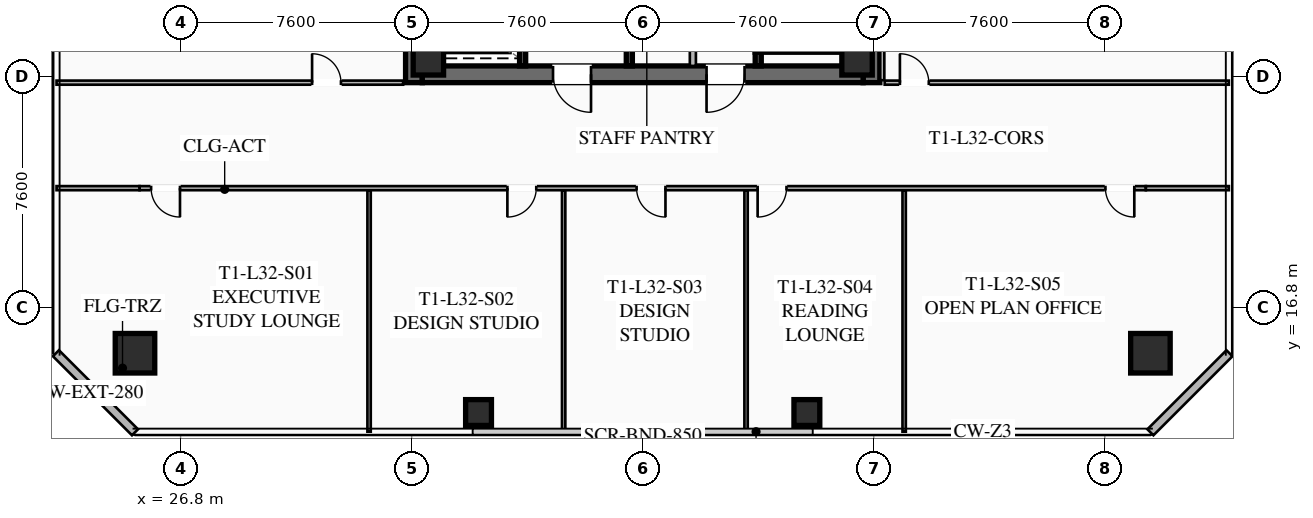
"""IFC4 building model, lengths in metres.
Left out: names, types, materials, properties, quantities, classifications, styles, units other than length and angle.
Written with IfcOpenShell. Run it as: python <this file> out.ifc"""

import sys

from ifc_helpers import new_model, si_unit, direction, frame, frame_2d, origin, origin_2d, place, context, subcontext, project, spatial, rectangle, hollow_rectangle, extrude, element, fill, save


model = new_model("IFC4")
c1 = context("Model", 3, precision=1e-05, world=origin(), true_north=direction((0.0, 1.0)))
c2 = subcontext(c1, "Body", "Model", "MODEL_VIEW")
j1 = project(units=[si_unit("LENGTHUNIT", "METRE"), si_unit("PLANEANGLEUNIT", "RADIAN")], contexts=[c1])
p1 = place(None, origin())
s1 = spatial("IfcSite", under=j1, at=p1, CompositionType="ELEMENT")
p2 = place(p1, origin())
s2 = spatial("IfcBuilding", under=s1, at=p2, CompositionType="ELEMENT")
p3 = place(p2, frame((0.0, 0.0, 121.5)))
s3 = spatial("IfcBuildingStorey", under=s2, at=p3, CompositionType="ELEMENT", Elevation=121.5)
for number, where, z_axis, x_axis in (
    (1, (34.475, 24.2, 0.0), (0.0, 0.0, 1.0), (0.0, 1.0, 0.0)),
    (2, (49.525, 39.8, 0.0), (0.0, 0.0, 1.0), (0.0, -1.0, 0.0)),
):
    element("IfcWall", number, at=place(p3, frame(where, z_axis=z_axis, x_axis=x_axis)), inside=s3, PredefinedType="SHEAR", context=c2, shape_type="SweptSolid", body=[
        extrude(rectangle(XDim=15.6, YDim=0.55, at=frame_2d((7.8, 0.0))), origin(), (0.0, 0.0, 1.0), 3.55),
    ])
p4 = place(p3, frame((49.25, 24.475, 0.0), z_axis=(0.0, 0.0, 1.0), x_axis=(-1.0, 0.0, 0.0)))
e3 = element("IfcWall", 3, at=p4, inside=s3, PredefinedType="SHEAR", context=c2, shape_type="SweptSolid", body=[
    extrude(rectangle(XDim=14.5, YDim=0.55, at=frame_2d((7.25, 0.0))), origin(), (0.0, 0.0, 1.0), 3.55),
])
p5 = place(p4, frame((8.95, 0.0, 0.0)))
e4 = element("IfcOpeningElement", 4, at=p5, cuts=e3, PredefinedType="OPENING", context=c2, shape_type="SweptSolid", body=[
    extrude(rectangle(XDim=1.25, YDim=2.25, at=frame_2d((0.625, 1.125))), frame((0.0, 0.285, 0.0), z_axis=(0.0, -1.0, 0.0), x_axis=(1.0, 0.0, 0.0)), (0.0, 0.0, 1.0), 0.57),
])
p6 = place(p4, frame((3.9, 0.0, 0.0)))
e5 = element("IfcOpeningElement", 5, at=p6, cuts=e3, PredefinedType="OPENING", context=c2, shape_type="SweptSolid", body=[
    extrude(rectangle(XDim=1.25, YDim=2.25, at=frame_2d((0.625, 1.125))), frame((0.0, 0.285, 0.0), z_axis=(0.0, -1.0, 0.0), x_axis=(1.0, 0.0, 0.0)), (0.0, 0.0, 1.0), 0.57),
])
for number, where, z_axis, x_axis in (
    (6, (34.95, 24.95, 0.0), (0.0, 0.0, 1.0), (1.0, 0.0, 0.0)),
    (7, (49.05, 24.95, 0.0), (0.0, 0.0, 1.0), (1.0, 0.0, 0.0)),
):
    element("IfcColumn", number, at=place(p3, frame(where, z_axis=z_axis, x_axis=x_axis)), inside=s3, PredefinedType="COLUMN", context=c2, shape_type="SweptSolid", body=[
        extrude(hollow_rectangle(XDim=1.0, YDim=1.0, WallThickness=0.04, at=origin_2d()), origin(), (0.0, 0.0, 1.0), 3.37),
    ])
for number, where, z_axis, x_axis in (
    (8, (25.3, 15.3, 0.0), (0.0, 0.0, 1.0), (1.0, 0.0, 0.0)),
    (9, (58.7, 15.3, 0.0), (0.0, 0.0, 1.0), (1.0, 0.0, 0.0)),
):
    element("IfcColumn", number, at=place(p3, frame(where, z_axis=z_axis, x_axis=x_axis)), inside=s3, PredefinedType="COLUMN", context=c2, shape_type="SweptSolid", body=[
        extrude(hollow_rectangle(XDim=1.3, YDim=1.3, WallThickness=0.05, at=origin_2d()), origin(), (0.0, 0.0, 1.0), 3.37),
    ])
for number, where, z_axis, x_axis in (
    (10, (36.6, 13.35, 0.0), (0.0, 0.0, 1.0), (1.0, 0.0, 0.0)),
    (11, (47.4, 13.35, 0.0), (0.0, 0.0, 1.0), (1.0, 0.0, 0.0)),
):
    element("IfcColumn", number, at=place(p3, frame(where, z_axis=z_axis, x_axis=x_axis)), inside=s3, PredefinedType="COLUMN", context=c2, shape_type="SweptSolid", body=[
        extrude(hollow_rectangle(XDim=0.85, YDim=0.85, WallThickness=0.035, at=origin_2d()), origin(), (0.0, 0.0, 1.0), 3.37),
    ])
for number, where, z_axis, x_axis in (
    (12, (25.3, 12.7, 0.0), (0.0, 0.0, 1.0), (-0.707, 0.707, 0.0)),
    (13, (61.3, 15.3, 0.0), (0.0, 0.0, 1.0), (-0.707, -0.707, 0.0)),
):
    element("IfcWall", number, at=place(p3, frame(where, z_axis=z_axis, x_axis=x_axis)), inside=s3, PredefinedType="SOLIDWALL", context=c2, shape_type="SweptSolid", body=[
        extrude(rectangle(XDim=3.677, YDim=0.28, at=frame_2d((1.838, 0.0))), origin(), (0.0, 0.0, 1.0), 3.37),
    ])
p7 = place(p3, frame((45.8, 32.8, 0.0), z_axis=(0.0, 0.0, 1.0), x_axis=(0.0, -1.0, 0.0)))
e14 = element("IfcWall", 14, at=p7, inside=s3, PredefinedType="SHEAR", context=c2, shape_type="SweptSolid", body=[
    extrude(rectangle(XDim=8.05, YDim=0.2, at=frame_2d((4.025, 0.0))), origin(), (0.0, 0.0, 1.0), 3.37),
])
p8 = place(p7, frame((0.45, 0.0, 0.0)))
e15 = element("IfcOpeningElement", 15, at=p8, cuts=e14, PredefinedType="OPENING", context=c2, shape_type="SweptSolid", body=[
    extrude(rectangle(XDim=1.15, YDim=2.2, at=frame_2d((0.575, 1.1))), frame((0.0, 0.11, 0.0), z_axis=(0.0, -1.0, 0.0), x_axis=(1.0, 0.0, 0.0)), (0.0, 0.0, 1.0), 0.22),
])
p9 = place(p3, frame((41.56, 24.75, 0.0), z_axis=(0.0, 0.0, 1.0), x_axis=(0.0, 1.0, 0.0)))
e16 = element("IfcWall", 16, at=p9, inside=s3, PredefinedType="SHEAR", context=c2, shape_type="SweptSolid", body=[
    extrude(rectangle(XDim=14.5, YDim=0.2, at=frame_2d((7.25, 0.0))), origin(), (0.0, 0.0, 1.0), 3.37),
])
p10 = place(p3, frame((38.05, 24.75, 0.0), z_axis=(0.0, 0.0, 1.0), x_axis=(0.0, 1.0, 0.0)))
e17 = element("IfcWall", 17, at=p10, inside=s3, PredefinedType="SHEAR", context=c2, shape_type="SweptSolid", body=[
    extrude(rectangle(XDim=6.45, YDim=0.2, at=frame_2d((3.225, 0.0))), origin(), (0.0, 0.0, 1.0), 3.37),
])
p11 = place(p10, frame((4.875, 0.0, 0.0)))
e18 = element("IfcOpeningElement", 18, at=p11, cuts=e17, PredefinedType="OPENING", context=c2, shape_type="SweptSolid", body=[
    extrude(rectangle(XDim=1.3, YDim=2.25, at=frame_2d((0.65, 1.125))), frame((0.0, 0.11, 0.0), z_axis=(0.0, -1.0, 0.0), x_axis=(1.0, 0.0, 0.0)), (0.0, 0.0, 1.0), 0.22),
])
p12 = place(p10, frame((2.875, 0.0, 0.0)))
e19 = element("IfcOpeningElement", 19, at=p12, cuts=e17, PredefinedType="OPENING", context=c2, shape_type="SweptSolid", body=[
    extrude(rectangle(XDim=1.3, YDim=2.25, at=frame_2d((0.65, 1.125))), frame((0.0, 0.11, 0.0), z_axis=(0.0, -1.0, 0.0), x_axis=(1.0, 0.0, 0.0)), (0.0, 0.0, 1.0), 0.22),
])
p13 = place(p10, frame((0.675, 0.0, 0.0)))
e20 = element("IfcOpeningElement", 20, at=p13, cuts=e17, PredefinedType="OPENING", context=c2, shape_type="SweptSolid", body=[
    extrude(rectangle(XDim=1.3, YDim=2.25, at=frame_2d((0.65, 1.125))), frame((0.0, 0.11, 0.0), z_axis=(0.0, -1.0, 0.0), x_axis=(1.0, 0.0, 0.0)), (0.0, 0.0, 1.0), 0.22),
])
p14 = place(p3, frame((43.65, 24.75, 0.0), z_axis=(0.0, 0.0, 1.0), x_axis=(0.0, 1.0, 0.0)))
e21 = element("IfcWall", 21, at=p14, inside=s3, PredefinedType="SOLIDWALL", context=c2, shape_type="SweptSolid", body=[
    extrude(rectangle(XDim=6.9, YDim=0.2, at=frame_2d((3.45, 0.0))), origin(), (0.0, 0.0, 1.0), 2.723),
])
p15 = place(p14, frame((0.85, 0.0, 0.0)))
e22 = element("IfcOpeningElement", 22, at=p15, cuts=e21, PredefinedType="OPENING", context=c2, shape_type="SweptSolid", body=[
    extrude(rectangle(XDim=0.95, YDim=2.05, at=frame_2d((0.475, 1.025))), frame((0.0, 0.11, 0.0), z_axis=(0.0, -1.0, 0.0), x_axis=(1.0, 0.0, 0.0)), (0.0, 0.0, 1.0), 0.22),
])
p16 = place(p14, frame((4.8, 0.0, 0.0)))
e23 = element("IfcOpeningElement", 23, at=p16, cuts=e21, PredefinedType="OPENING", context=c2, shape_type="SweptSolid", body=[
    extrude(rectangle(XDim=1.05, YDim=2.2, at=frame_2d((0.525, 1.1))), frame((0.0, 0.11, 0.0), z_axis=(0.0, -1.0, 0.0), x_axis=(1.0, 0.0, 0.0)), (0.0, 0.0, 1.0), 0.22),
])
p17 = place(p3, frame((58.55, 20.73, 0.0), z_axis=(0.0, 0.0, 1.0), x_axis=(-1.0, 0.0, 0.0)))
e24 = element("IfcWall", 24, at=p17, inside=s3, PredefinedType="PARTITIONING", context=c2, shape_type="SweptSolid", body=[
    extrude(rectangle(XDim=33.1, YDim=0.135, at=frame_2d((16.55, 0.0))), origin(), (0.0, 0.0, 1.0), 2.723),
])
p18 = place(p17, frame((31.77, 0.0, 0.0)))
e25 = element("IfcOpeningElement", 25, at=p18, cuts=e24, PredefinedType="OPENING", context=c2, shape_type="SweptSolid", body=[
    extrude(rectangle(XDim=0.95, YDim=2.05, at=frame_2d((0.475, 1.025))), frame((0.0, 0.077, 0.0), z_axis=(0.0, -1.0, 0.0), x_axis=(1.0, 0.0, 0.0)), (0.0, 0.0, 1.0), 0.155),
])
p19 = place(p17, frame((20.051, 0.0, 0.0)))
e26 = element("IfcOpeningElement", 26, at=p19, cuts=e24, PredefinedType="OPENING", context=c2, shape_type="SweptSolid", body=[
    extrude(rectangle(XDim=0.95, YDim=2.05, at=frame_2d((0.475, 1.025))), frame((0.0, 0.077, 0.0), z_axis=(0.0, -1.0, 0.0), x_axis=(1.0, 0.0, 0.0)), (0.0, 0.0, 1.0), 0.155),
])
p20 = place(p17, frame((15.801, 0.0, 0.0)))
e27 = element("IfcOpeningElement", 27, at=p20, cuts=e24, PredefinedType="OPENING", context=c2, shape_type="SweptSolid", body=[
    extrude(rectangle(XDim=0.95, YDim=2.05, at=frame_2d((0.475, 1.025))), frame((0.0, 0.077, 0.0), z_axis=(0.0, -1.0, 0.0), x_axis=(1.0, 0.0, 0.0)), (0.0, 0.0, 1.0), 0.155),
])
p21 = place(p17, frame((11.82, 0.0, 0.0)))
e28 = element("IfcOpeningElement", 28, at=p21, cuts=e24, PredefinedType="OPENING", context=c2, shape_type="SweptSolid", body=[
    extrude(rectangle(XDim=0.95, YDim=2.05, at=frame_2d((0.475, 1.025))), frame((0.0, 0.077, 0.0), z_axis=(0.0, -1.0, 0.0), x_axis=(1.0, 0.0, 0.0)), (0.0, 0.0, 1.0), 0.155),
])
p22 = place(p17, frame((0.38, 0.0, 0.0)))
e29 = element("IfcOpeningElement", 29, at=p22, cuts=e24, PredefinedType="OPENING", context=c2, shape_type="SweptSolid", body=[
    extrude(rectangle(XDim=0.95, YDim=2.05, at=frame_2d((0.475, 1.025))), frame((0.0, 0.077, 0.0), z_axis=(0.0, -1.0, 0.0), x_axis=(1.0, 0.0, 0.0)), (0.0, 0.0, 1.0), 0.155),
])
for number, where, z_axis, x_axis in (
    (30, (22.72, 20.73, 0.0), (0.0, 0.0, 1.0), (1.0, 0.0, 0.0)),
    (31, (58.55, 20.73, 0.0), (0.0, 0.0, 1.0), (1.0, 0.0, 0.0)),
):
    element("IfcWall", number, at=place(p3, frame(where, z_axis=z_axis, x_axis=x_axis)), inside=s3, PredefinedType="PARTITIONING", context=c2, shape_type="SweptSolid", body=[
        extrude(rectangle(XDim=2.73, YDim=0.135, at=frame_2d((1.365, 0.0))), origin(), (0.0, 0.0, 1.0), 2.723),
    ])
for number, where, z_axis, x_axis in (
    (32, (33.0, 12.72, 0.0), (0.0, 0.0, 1.0), (0.0, 1.0, 0.0)),
    (33, (39.4, 12.72, 0.0), (0.0, 0.0, 1.0), (0.0, 1.0, 0.0)),
    (34, (45.4, 12.72, 0.0), (0.0, 0.0, 1.0), (0.0, 1.0, 0.0)),
    (35, (50.6, 12.72, 0.0), (0.0, 0.0, 1.0), (0.0, 1.0, 0.0)),
):
    element("IfcWall", number, at=place(p3, frame(where, z_axis=z_axis, x_axis=x_axis)), inside=s3, PredefinedType="PARTITIONING", context=c2, shape_type="SweptSolid", body=[
        extrude(rectangle(XDim=7.93, YDim=0.11, at=frame_2d((3.965, 0.0))), origin(), (0.0, 0.0, 1.0), 2.723),
    ])
p23 = place(p3, frame((49.88, 39.72, 0.0), z_axis=(0.0, 0.0, 1.0), x_axis=(0.0, -1.0, 0.0)))
e36 = element("IfcWall", 36, at=p23, inside=s3, PredefinedType="PARTITIONING", context=c2, shape_type="SweptSolid", body=[
    extrude(rectangle(XDim=15.44, YDim=0.135, at=frame_2d((7.72, 0.0))), origin(), (0.0, 0.0, 1.0), 2.723),
])
p24 = place(p3, frame((49.96, 24.2, 0.0), z_axis=(0.0, 0.0, 1.0), x_axis=(1.0, 0.0, 0.0)))
e37 = element("IfcWall", 37, at=p24, inside=s3, PredefinedType="PARTITIONING", context=c2, shape_type="SweptSolid", body=[
    extrude(rectangle(XDim=11.32, YDim=0.135, at=frame_2d((5.66, 0.0))), origin(), (0.0, 0.0, 1.0), 2.723),
])
p25 = place(p24, frame((0.5, 0.0, 0.0)))
e38 = element("IfcOpeningElement", 38, at=p25, cuts=e37, PredefinedType="OPENING", context=c2, shape_type="SweptSolid", body=[
    extrude(rectangle(XDim=0.95, YDim=2.05, at=frame_2d((0.475, 1.025))), frame((0.0, 0.077, 0.0), z_axis=(0.0, -1.0, 0.0), x_axis=(1.0, 0.0, 0.0)), (0.0, 0.0, 1.0), 0.155),
])
p26 = place(p3, frame((22.72, 24.2, 0.0), z_axis=(0.0, 0.0, 1.0), x_axis=(1.0, 0.0, 0.0)))
e39 = element("IfcWall", 39, at=p26, inside=s3, PredefinedType="PARTITIONING", context=c2, shape_type="SweptSolid", body=[
    extrude(rectangle(XDim=11.4, YDim=0.135, at=frame_2d((5.7, 0.0))), origin(), (0.0, 0.0, 1.0), 2.723),
])
p27 = place(p26, frame((8.405, 0.0, 0.0)))
e40 = element("IfcOpeningElement", 40, at=p27, cuts=e39, PredefinedType="OPENING", context=c2, shape_type="SweptSolid", body=[
    extrude(rectangle(XDim=0.95, YDim=2.05, at=frame_2d((0.475, 1.025))), frame((0.0, 0.077, 0.0), z_axis=(0.0, -1.0, 0.0), x_axis=(1.0, 0.0, 0.0)), (0.0, 0.0, 1.0), 0.155),
])
p28 = place(p5, origin())
e41 = element("IfcDoor", 41, at=p28, inside=s3, OperationType="SINGLE_SWING_LEFT", PredefinedType="DOOR", context=c2, shape_type="SweptSolid", body=[
    extrude(rectangle(XDim=1.25, YDim=2.25, at=frame_2d((0.625, 1.125))), frame((0.0, 0.025, 0.0), z_axis=(0.0, -1.0, 0.0), x_axis=(1.0, 0.0, 0.0)), (0.0, 0.0, 1.0), 0.05),
])
fill(e4, e41)
p29 = place(p6, origin())
e42 = element("IfcDoor", 42, at=p29, inside=s3, OperationType="SINGLE_SWING_RIGHT", PredefinedType="DOOR", context=c2, shape_type="SweptSolid", body=[
    extrude(rectangle(XDim=1.25, YDim=2.25, at=frame_2d((0.625, 1.125))), frame((0.0, 0.025, 0.0), z_axis=(0.0, -1.0, 0.0), x_axis=(1.0, 0.0, 0.0)), (0.0, 0.0, 1.0), 0.05),
])
fill(e5, e42)
p30 = place(p18, origin())
e43 = element("IfcDoor", 43, at=p30, inside=s3, OperationType="SINGLE_SWING_LEFT", PredefinedType="DOOR", context=c2, shape_type="SweptSolid", body=[
    extrude(rectangle(XDim=0.95, YDim=2.05, at=frame_2d((0.475, 1.025))), frame((0.0, 0.025, 0.0), z_axis=(0.0, -1.0, 0.0), x_axis=(1.0, 0.0, 0.0)), (0.0, 0.0, 1.0), 0.05),
])
fill(e25, e43)
p31 = place(p19, origin())
e44 = element("IfcDoor", 44, at=p31, inside=s3, OperationType="SINGLE_SWING_RIGHT", PredefinedType="DOOR", context=c2, shape_type="SweptSolid", body=[
    extrude(rectangle(XDim=0.95, YDim=2.05, at=frame_2d((0.475, 1.025))), frame((0.0, 0.025, 0.0), z_axis=(0.0, -1.0, 0.0), x_axis=(1.0, 0.0, 0.0)), (0.0, 0.0, 1.0), 0.05),
])
fill(e26, e44)
p32 = place(p20, origin())
e45 = element("IfcDoor", 45, at=p32, inside=s3, OperationType="SINGLE_SWING_LEFT", PredefinedType="DOOR", context=c2, shape_type="SweptSolid", body=[
    extrude(rectangle(XDim=0.95, YDim=2.05, at=frame_2d((0.475, 1.025))), frame((0.0, 0.025, 0.0), z_axis=(0.0, -1.0, 0.0), x_axis=(1.0, 0.0, 0.0)), (0.0, 0.0, 1.0), 0.05),
])
fill(e27, e45)
p33 = place(p21, origin())
e46 = element("IfcDoor", 46, at=p33, inside=s3, OperationType="SINGLE_SWING_RIGHT", PredefinedType="DOOR", context=c2, shape_type="SweptSolid", body=[
    extrude(rectangle(XDim=0.95, YDim=2.05, at=frame_2d((0.475, 1.025))), frame((0.0, 0.025, 0.0), z_axis=(0.0, -1.0, 0.0), x_axis=(1.0, 0.0, 0.0)), (0.0, 0.0, 1.0), 0.05),
])
fill(e28, e46)
p34 = place(p22, origin())
e47 = element("IfcDoor", 47, at=p34, inside=s3, OperationType="SINGLE_SWING_LEFT", PredefinedType="DOOR", context=c2, shape_type="SweptSolid", body=[
    extrude(rectangle(XDim=0.95, YDim=2.05, at=frame_2d((0.475, 1.025))), frame((0.0, 0.025, 0.0), z_axis=(0.0, -1.0, 0.0), x_axis=(1.0, 0.0, 0.0)), (0.0, 0.0, 1.0), 0.05),
])
fill(e29, e47)
p35 = place(p25, origin())
e48 = element("IfcDoor", 48, at=p35, inside=s3, OperationType="SINGLE_SWING_LEFT", PredefinedType="DOOR", context=c2, shape_type="SweptSolid", body=[
    extrude(rectangle(XDim=0.95, YDim=2.05, at=frame_2d((0.475, 1.025))), frame((0.0, 0.025, 0.0), z_axis=(0.0, -1.0, 0.0), x_axis=(1.0, 0.0, 0.0)), (0.0, 0.0, 1.0), 0.05),
])
fill(e38, e48)
p36 = place(p27, origin())
e49 = element("IfcDoor", 49, at=p36, inside=s3, OperationType="SINGLE_SWING_LEFT", PredefinedType="DOOR", context=c2, shape_type="SweptSolid", body=[
    extrude(rectangle(XDim=0.95, YDim=2.05, at=frame_2d((0.475, 1.025))), frame((0.0, 0.025, 0.0), z_axis=(0.0, -1.0, 0.0), x_axis=(1.0, 0.0, 0.0)), (0.0, 0.0, 1.0), 0.05),
])
fill(e40, e49)
save(model, sys.argv[1])
